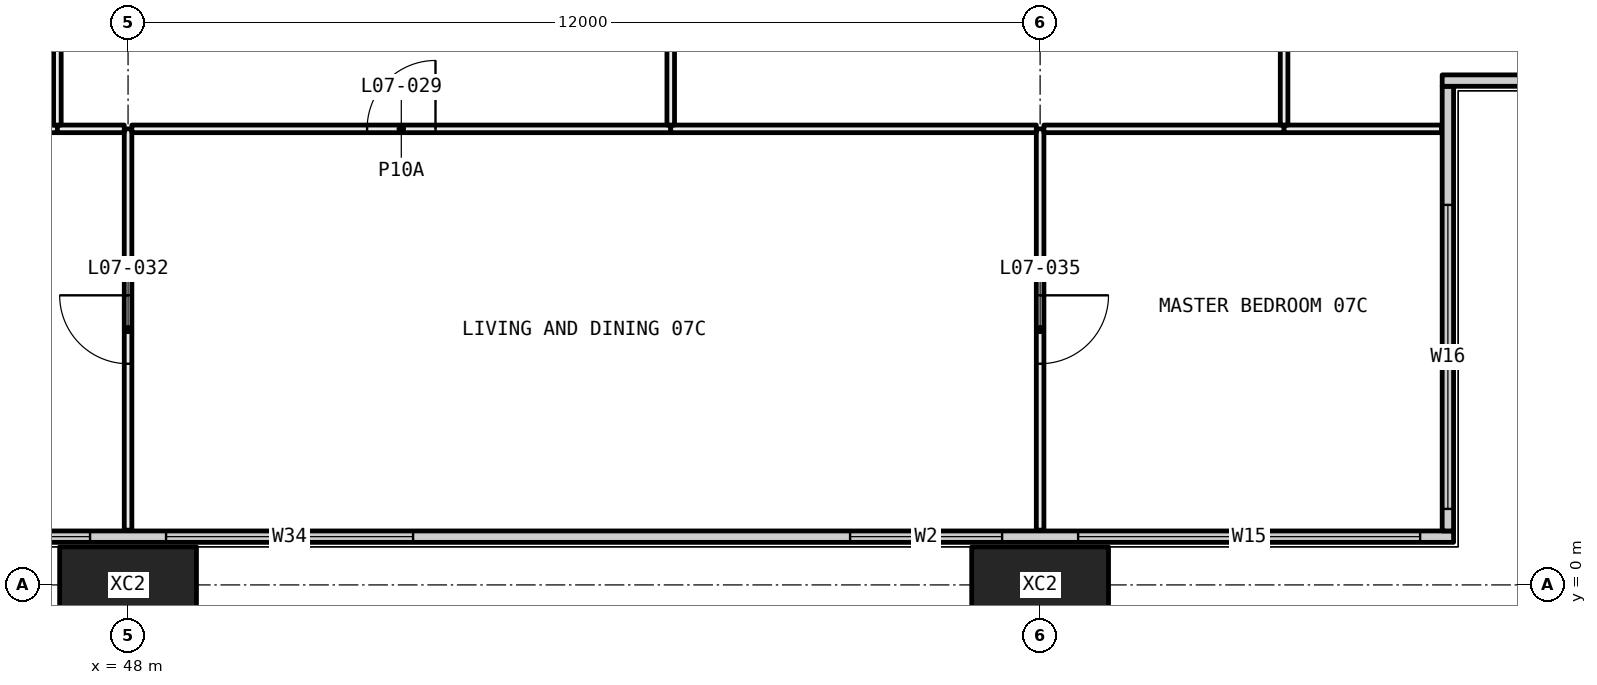
"""IFC4 building model, lengths in metres.
Left out: names, types, materials, properties, quantities, classifications, styles, units other than length and angle.
Written with IfcOpenShell. Run it as: python <this file> out.ifc"""

import sys

from ifc_helpers import new_model, si_unit, direction, frame, frame_2d, origin, origin_2d, place, context, subcontext, project, spatial, rectangle, hollow_rectangle, extrude, element, fill, save


model = new_model("IFC4")
c1 = context("Model", 3, precision=1e-05, world=origin(), true_north=direction((0.0, 1.0)))
c2 = subcontext(c1, "Body", "Model", "MODEL_VIEW")
j1 = project(units=[si_unit("LENGTHUNIT", "METRE"), si_unit("PLANEANGLEUNIT", "RADIAN")], contexts=[c1])
p1 = place(None, origin())
s1 = spatial("IfcSite", under=j1, at=p1, CompositionType="ELEMENT")
p2 = place(p1, origin())
s2 = spatial("IfcBuilding", under=s1, at=p2, CompositionType="ELEMENT")
p3 = place(p2, frame((0.0, 0.0, 36.9)))
s3 = spatial("IfcBuildingStorey", under=s2, at=p3, CompositionType="ELEMENT", Elevation=36.9)
for number, where, z_axis, x_axis in (
    (1, (48.0, 0.0, -0.4), (0.0, 0.0, 1.0), (1.0, 0.0, 0.0)),
    (2, (60.0, 0.0, -0.4), (0.0, 0.0, 1.0), (1.0, 0.0, 0.0)),
):
    element("IfcColumn", number, at=place(p3, frame(where, z_axis=z_axis, x_axis=x_axis)), inside=s3, PredefinedType="COLUMN", context=c2, shape_type="SweptSolid", body=[
        extrude(hollow_rectangle(XDim=1.8, YDim=1.0, WallThickness=0.07, at=origin_2d()), origin(), (0.0, 0.0, 1.0), 3.45),
    ])
p4 = place(p3, frame((6.56, 0.635, 0.0), z_axis=(0.0, 0.0, 1.0), x_axis=(1.0, 0.0, 0.0)))
e3 = element("IfcWall", 3, at=p4, inside=s3, PredefinedType="ELEMENTEDWALL", context=c2, shape_type="SweptSolid", body=[
    extrude(rectangle(XDim=58.88, YDim=0.15, at=frame_2d((29.44, 0.0))), origin(), (0.0, 0.0, 1.0), 3.05),
])
p5 = place(p4, frame((0.44, 0.0, 0.45)))
e4 = element("IfcOpeningElement", 4, at=p5, cuts=e3, PredefinedType="OPENING", context=c2, shape_type="SweptSolid", body=[
    extrude(rectangle(XDim=4.5, YDim=2.55, at=frame_2d((2.25, 1.275))), frame((0.0, 0.085, 0.0), z_axis=(0.0, -1.0, 0.0), x_axis=(1.0, 0.0, 0.0)), (0.0, 0.0, 1.0), 0.17),
])
p6 = place(p4, frame((5.94, 0.0, 0.45)))
e5 = element("IfcOpeningElement", 5, at=p6, cuts=e3, PredefinedType="OPENING", context=c2, shape_type="SweptSolid", body=[
    extrude(rectangle(XDim=3.25, YDim=2.55, at=frame_2d((1.625, 1.275))), frame((0.0, 0.085, 0.0), z_axis=(0.0, -1.0, 0.0), x_axis=(1.0, 0.0, 0.0)), (0.0, 0.0, 1.0), 0.17),
])
p7 = place(p4, frame((13.69, 0.0, 0.45)))
e6 = element("IfcOpeningElement", 6, at=p7, cuts=e3, PredefinedType="OPENING", context=c2, shape_type="SweptSolid", body=[
    extrude(rectangle(XDim=3.25, YDim=2.55, at=frame_2d((1.625, 1.275))), frame((0.0, 0.085, 0.0), z_axis=(0.0, -1.0, 0.0), x_axis=(1.0, 0.0, 0.0)), (0.0, 0.0, 1.0), 0.17),
])
p8 = place(p4, frame((17.94, 0.0, 0.45)))
e7 = element("IfcOpeningElement", 7, at=p8, cuts=e3, PredefinedType="OPENING", context=c2, shape_type="SweptSolid", body=[
    extrude(rectangle(XDim=3.25, YDim=2.55, at=frame_2d((1.625, 1.275))), frame((0.0, 0.085, 0.0), z_axis=(0.0, -1.0, 0.0), x_axis=(1.0, 0.0, 0.0)), (0.0, 0.0, 1.0), 0.17),
])
p9 = place(p4, frame((26.94, 0.0, 0.45)))
e8 = element("IfcOpeningElement", 8, at=p9, cuts=e3, PredefinedType="OPENING", context=c2, shape_type="SweptSolid", body=[
    extrude(rectangle(XDim=2.0, YDim=2.55, at=frame_2d((1.0, 1.275))), frame((0.0, 0.085, 0.0), z_axis=(0.0, -1.0, 0.0), x_axis=(1.0, 0.0, 0.0)), (0.0, 0.0, 1.0), 0.17),
])
p10 = place(p4, frame((29.94, 0.0, 0.45)))
e9 = element("IfcOpeningElement", 9, at=p10, cuts=e3, PredefinedType="OPENING", context=c2, shape_type="SweptSolid", body=[
    extrude(rectangle(XDim=3.25, YDim=2.55, at=frame_2d((1.625, 1.275))), frame((0.0, 0.085, 0.0), z_axis=(0.0, -1.0, 0.0), x_axis=(1.0, 0.0, 0.0)), (0.0, 0.0, 1.0), 0.17),
])
p11 = place(p4, frame((37.69, 0.0, 0.45)))
e10 = element("IfcOpeningElement", 10, at=p11, cuts=e3, PredefinedType="OPENING", context=c2, shape_type="SweptSolid", body=[
    extrude(rectangle(XDim=3.25, YDim=2.55, at=frame_2d((1.625, 1.275))), frame((0.0, 0.085, 0.0), z_axis=(0.0, -1.0, 0.0), x_axis=(1.0, 0.0, 0.0)), (0.0, 0.0, 1.0), 0.17),
])
p12 = place(p4, frame((41.94, 0.0, 0.45)))
e11 = element("IfcOpeningElement", 11, at=p12, cuts=e3, PredefinedType="OPENING", context=c2, shape_type="SweptSolid", body=[
    extrude(rectangle(XDim=3.25, YDim=2.55, at=frame_2d((1.625, 1.275))), frame((0.0, 0.085, 0.0), z_axis=(0.0, -1.0, 0.0), x_axis=(1.0, 0.0, 0.0)), (0.0, 0.0, 1.0), 0.17),
])
p13 = place(p4, frame((50.94, 0.0, 0.45)))
e12 = element("IfcOpeningElement", 12, at=p13, cuts=e3, PredefinedType="OPENING", context=c2, shape_type="SweptSolid", body=[
    extrude(rectangle(XDim=2.0, YDim=2.55, at=frame_2d((1.0, 1.275))), frame((0.0, 0.085, 0.0), z_axis=(0.0, -1.0, 0.0), x_axis=(1.0, 0.0, 0.0)), (0.0, 0.0, 1.0), 0.17),
])
p14 = place(p4, frame((53.94, 0.0, 0.45)))
e13 = element("IfcOpeningElement", 13, at=p14, cuts=e3, PredefinedType="OPENING", context=c2, shape_type="SweptSolid", body=[
    extrude(rectangle(XDim=4.5, YDim=2.55, at=frame_2d((2.25, 1.275))), frame((0.0, 0.085, 0.0), z_axis=(0.0, -1.0, 0.0), x_axis=(1.0, 0.0, 0.0)), (0.0, 0.0, 1.0), 0.17),
])
p15 = place(p3, frame((65.365, 0.71, 0.0), z_axis=(0.0, 0.0, 1.0), x_axis=(0.0, 1.0, 0.0)))
e14 = element("IfcWall", 14, at=p15, inside=s3, PredefinedType="ELEMENTEDWALL", context=c2, shape_type="SweptSolid", body=[
    extrude(rectangle(XDim=5.85, YDim=0.15, at=frame_2d((2.925, 0.0))), origin(), (0.0, 0.0, 1.0), 3.05),
])
p16 = place(p15, frame((0.29, 0.0, 0.45)))
e15 = element("IfcOpeningElement", 15, at=p16, cuts=e14, PredefinedType="OPENING", context=c2, shape_type="SweptSolid", body=[
    extrude(rectangle(XDim=4.0, YDim=2.55, at=frame_2d((2.0, 1.275))), frame((0.0, 0.085, 0.0), z_axis=(0.0, -1.0, 0.0), x_axis=(1.0, 0.0, 0.0)), (0.0, 0.0, 1.0), 0.17),
])
p17 = place(p3, frame((65.29, 6.635, 0.0), z_axis=(0.0, 0.0, 1.0), x_axis=(1.0, 0.0, 0.0)))
e16 = element("IfcWall", 16, at=p17, inside=s3, PredefinedType="ELEMENTEDWALL", context=c2, shape_type="SweptSolid", body=[
    extrude(rectangle(XDim=6.15, YDim=0.15, at=frame_2d((3.075, 0.0))), origin(), (0.0, 0.0, 1.0), 3.05),
])
p18 = place(p17, frame((1.71, 0.0, 0.45)))
e17 = element("IfcOpeningElement", 17, at=p18, cuts=e16, PredefinedType="OPENING", context=c2, shape_type="SweptSolid", body=[
    extrude(rectangle(XDim=4.0, YDim=2.55, at=frame_2d((2.0, 1.275))), frame((0.0, 0.085, 0.0), z_axis=(0.0, -1.0, 0.0), x_axis=(1.0, 0.0, 0.0)), (0.0, 0.0, 1.0), 0.17),
])
p19 = place(p3, frame((48.0, 0.72, 0.0), z_axis=(0.0, 0.0, 1.0), x_axis=(0.0, 1.0, 0.0)))
e18 = element("IfcWall", 18, at=p19, inside=s3, PredefinedType="PARTITIONING", context=c2, shape_type="SweptSolid", body=[
    extrude(rectangle(XDim=5.28, YDim=0.1, at=frame_2d((2.64, 0.0))), origin(), (0.0, 0.0, 1.0), 2.45),
])
p20 = place(p19, frame((2.19, 0.0, 0.0)))
e19 = element("IfcOpeningElement", 19, at=p20, cuts=e18, PredefinedType="OPENING", context=c2, shape_type="SweptSolid", body=[
    extrude(rectangle(XDim=0.9, YDim=2.1, at=frame_2d((0.45, 1.05))), frame((0.0, 0.06, 0.0), z_axis=(0.0, -1.0, 0.0), x_axis=(1.0, 0.0, 0.0)), (0.0, 0.0, 1.0), 0.12),
])
p21 = place(p3, frame((47.07, 6.0, 0.0), z_axis=(0.0, 0.0, 1.0), x_axis=(-1.0, 0.0, 0.0)))
e20 = element("IfcWall", 20, at=p21, inside=s3, PredefinedType="PARTITIONING", context=c2, shape_type="SweptSolid", body=[
    extrude(rectangle(XDim=5.02, YDim=0.1, at=frame_2d((2.51, 0.0))), origin(), (0.0, 0.0, 1.0), 3.05),
])
p22 = place(p3, frame((47.95, 6.0, 0.0), z_axis=(0.0, 0.0, 1.0), x_axis=(-1.0, 0.0, 0.0)))
e21 = element("IfcWall", 21, at=p22, inside=s3, PredefinedType="PARTITIONING", context=c2, shape_type="SweptSolid", body=[
    extrude(rectangle(XDim=0.88, YDim=0.1, at=frame_2d((0.44, 0.0))), origin(), (0.0, 0.0, 1.0), 2.45),
])
p23 = place(p3, frame((60.0, 0.72, 0.0), z_axis=(0.0, 0.0, 1.0), x_axis=(0.0, 1.0, 0.0)))
e22 = element("IfcWall", 22, at=p23, inside=s3, PredefinedType="PARTITIONING", context=c2, shape_type="SweptSolid", body=[
    extrude(rectangle(XDim=5.28, YDim=0.1, at=frame_2d((2.64, 0.0))), origin(), (0.0, 0.0, 1.0), 2.45),
])
p24 = place(p23, frame((2.19, 0.0, 0.0)))
e23 = element("IfcOpeningElement", 23, at=p24, cuts=e22, PredefinedType="OPENING", context=c2, shape_type="SweptSolid", body=[
    extrude(rectangle(XDim=0.9, YDim=2.1, at=frame_2d((0.45, 1.05))), frame((0.0, 0.06, 0.0), z_axis=(0.0, -1.0, 0.0), x_axis=(1.0, 0.0, 0.0)), (0.0, 0.0, 1.0), 0.12),
])
p25 = place(p3, frame((55.14, 6.0, 0.0), z_axis=(0.0, 0.0, 1.0), x_axis=(-1.0, 0.0, 0.0)))
e24 = element("IfcWall", 24, at=p25, inside=s3, PredefinedType="PARTITIONING", context=c2, shape_type="SweptSolid", body=[
    extrude(rectangle(XDim=7.09, YDim=0.1, at=frame_2d((3.545, 0.0))), origin(), (0.0, 0.0, 1.0), 2.45),
])
p26 = place(p25, frame((3.095, 0.0, 0.0)))
e25 = element("IfcOpeningElement", 25, at=p26, cuts=e24, PredefinedType="OPENING", context=c2, shape_type="SweptSolid", body=[
    extrude(rectangle(XDim=0.9, YDim=2.1, at=frame_2d((0.45, 1.05))), frame((0.0, 0.06, 0.0), z_axis=(0.0, -1.0, 0.0), x_axis=(1.0, 0.0, 0.0)), (0.0, 0.0, 1.0), 0.12),
])
p27 = place(p3, frame((59.95, 6.0, 0.0), z_axis=(0.0, 0.0, 1.0), x_axis=(-1.0, 0.0, 0.0)))
e26 = element("IfcWall", 26, at=p27, inside=s3, PredefinedType="PARTITIONING", context=c2, shape_type="SweptSolid", body=[
    extrude(rectangle(XDim=4.81, YDim=0.1, at=frame_2d((2.405, 0.0))), origin(), (0.0, 0.0, 1.0), 2.45),
])
p28 = place(p3, frame((63.21, 6.0, 0.0), z_axis=(0.0, 0.0, 1.0), x_axis=(-1.0, 0.0, 0.0)))
e27 = element("IfcWall", 27, at=p28, inside=s3, PredefinedType="PARTITIONING", context=c2, shape_type="SweptSolid", body=[
    extrude(rectangle(XDim=3.16, YDim=0.1, at=frame_2d((1.58, 0.0))), origin(), (0.0, 0.0, 1.0), 2.45),
])
p29 = place(p3, frame((65.28, 6.0, 0.0), z_axis=(0.0, 0.0, 1.0), x_axis=(-1.0, 0.0, 0.0)))
e28 = element("IfcWall", 28, at=p29, inside=s3, PredefinedType="PARTITIONING", context=c2, shape_type="SweptSolid", body=[
    extrude(rectangle(XDim=2.07, YDim=0.1, at=frame_2d((1.035, 0.0))), origin(), (0.0, 0.0, 1.0), 3.05),
])
p30 = place(p3, frame((47.07, 6.05, 0.0), z_axis=(0.0, 0.0, 1.0), x_axis=(0.0, 1.0, 0.0)))
e29 = element("IfcWall", 29, at=p30, inside=s3, PredefinedType="PARTITIONING", context=c2, shape_type="SweptSolid", body=[
    extrude(rectangle(XDim=5.95, YDim=0.1, at=frame_2d((2.975, 0.0))), origin(), (0.0, 0.0, 1.0), 2.45),
])
p31 = place(p30, frame((2.525, 0.0, 0.0)))
e30 = element("IfcOpeningElement", 30, at=p31, cuts=e29, PredefinedType="OPENING", context=c2, shape_type="SweptSolid", body=[
    extrude(rectangle(XDim=0.9, YDim=2.1, at=frame_2d((0.45, 1.05))), frame((0.0, 0.06, 0.0), z_axis=(0.0, -1.0, 0.0), x_axis=(1.0, 0.0, 0.0)), (0.0, 0.0, 1.0), 0.12),
])
p32 = place(p3, frame((55.14, 6.05, 0.0), z_axis=(0.0, 0.0, 1.0), x_axis=(0.0, 1.0, 0.0)))
e31 = element("IfcWall", 31, at=p32, inside=s3, PredefinedType="PARTITIONING", context=c2, shape_type="SweptSolid", body=[
    extrude(rectangle(XDim=5.95, YDim=0.1, at=frame_2d((2.975, 0.0))), origin(), (0.0, 0.0, 1.0), 2.45),
])
p33 = place(p32, frame((2.525, 0.0, 0.0)))
e32 = element("IfcOpeningElement", 32, at=p33, cuts=e31, PredefinedType="OPENING", context=c2, shape_type="SweptSolid", body=[
    extrude(rectangle(XDim=0.9, YDim=2.1, at=frame_2d((0.45, 1.05))), frame((0.0, 0.06, 0.0), z_axis=(0.0, -1.0, 0.0), x_axis=(1.0, 0.0, 0.0)), (0.0, 0.0, 1.0), 0.12),
])
p34 = place(p3, frame((63.21, 6.05, 0.0), z_axis=(0.0, 0.0, 1.0), x_axis=(0.0, 1.0, 0.0)))
e33 = element("IfcWall", 33, at=p34, inside=s3, PredefinedType="PARTITIONING", context=c2, shape_type="SweptSolid", body=[
    extrude(rectangle(XDim=5.875, YDim=0.1, at=frame_2d((2.938, 0.0))), origin(), (0.0, 0.0, 1.0), 2.45),
])
p35 = place(p34, frame((2.488, 0.0, 0.0)))
e34 = element("IfcOpeningElement", 34, at=p35, cuts=e33, PredefinedType="OPENING", context=c2, shape_type="SweptSolid", body=[
    extrude(rectangle(XDim=0.9, YDim=2.1, at=frame_2d((0.45, 1.05))), frame((0.0, 0.06, 0.0), z_axis=(0.0, -1.0, 0.0), x_axis=(1.0, 0.0, 0.0)), (0.0, 0.0, 1.0), 0.12),
])
p36 = place(p11, origin())
e35 = element("IfcWindow", 35, at=p36, inside=s3, PartitioningType="SINGLE_PANEL", PredefinedType="WINDOW", context=c2, shape_type="SweptSolid", body=[
    extrude(rectangle(XDim=3.25, YDim=2.55, at=frame_2d((1.625, 1.275))), frame((0.0, 0.03, 0.0), z_axis=(0.0, -1.0, 0.0), x_axis=(1.0, 0.0, 0.0)), (0.0, 0.0, 1.0), 0.06),
])
fill(e10, e35)
p37 = place(p12, origin())
e36 = element("IfcWindow", 36, at=p37, inside=s3, PartitioningType="SINGLE_PANEL", PredefinedType="WINDOW", context=c2, shape_type="SweptSolid", body=[
    extrude(rectangle(XDim=3.25, YDim=2.55, at=frame_2d((1.625, 1.275))), frame((0.0, 0.03, 0.0), z_axis=(0.0, -1.0, 0.0), x_axis=(1.0, 0.0, 0.0)), (0.0, 0.0, 1.0), 0.06),
])
fill(e11, e36)
p38 = place(p13, origin())
e37 = element("IfcWindow", 37, at=p38, inside=s3, PartitioningType="SINGLE_PANEL", PredefinedType="WINDOW", context=c2, shape_type="SweptSolid", body=[
    extrude(rectangle(XDim=2.0, YDim=2.55, at=frame_2d((1.0, 1.275))), frame((0.0, 0.03, 0.0), z_axis=(0.0, -1.0, 0.0), x_axis=(1.0, 0.0, 0.0)), (0.0, 0.0, 1.0), 0.06),
])
fill(e12, e37)
p39 = place(p14, origin())
e38 = element("IfcWindow", 38, at=p39, inside=s3, PartitioningType="SINGLE_PANEL", PredefinedType="WINDOW", context=c2, shape_type="SweptSolid", body=[
    extrude(rectangle(XDim=4.5, YDim=2.55, at=frame_2d((2.25, 1.275))), frame((0.0, 0.03, 0.0), z_axis=(0.0, -1.0, 0.0), x_axis=(1.0, 0.0, 0.0)), (0.0, 0.0, 1.0), 0.06),
])
fill(e13, e38)
p40 = place(p16, origin())
e39 = element("IfcWindow", 39, at=p40, inside=s3, PartitioningType="SINGLE_PANEL", PredefinedType="WINDOW", context=c2, shape_type="SweptSolid", body=[
    extrude(rectangle(XDim=4.0, YDim=2.55, at=frame_2d((2.0, 1.275))), frame((0.0, 0.03, 0.0), z_axis=(0.0, -1.0, 0.0), x_axis=(1.0, 0.0, 0.0)), (0.0, 0.0, 1.0), 0.06),
])
fill(e15, e39)
p41 = place(p26, frame((0.9, 0.0, 0.0), x_axis=(-1.0, 0.0, 0.0)))
e40 = element("IfcDoor", 40, at=p41, inside=s3, OperationType="SINGLE_SWING_LEFT", PredefinedType="DOOR", context=c2, shape_type="SweptSolid", body=[
    extrude(rectangle(XDim=0.9, YDim=2.1, at=frame_2d((0.45, 1.05))), frame((0.0, 0.025, 0.0), z_axis=(0.0, -1.0, 0.0), x_axis=(1.0, 0.0, 0.0)), (0.0, 0.0, 1.0), 0.05),
])
fill(e25, e40)
p42 = place(p20, origin())
e41 = element("IfcDoor", 41, at=p42, inside=s3, OperationType="SINGLE_SWING_LEFT", PredefinedType="DOOR", context=c2, shape_type="SweptSolid", body=[
    extrude(rectangle(XDim=0.9, YDim=2.1, at=frame_2d((0.45, 1.05))), frame((0.0, 0.025, 0.0), z_axis=(0.0, -1.0, 0.0), x_axis=(1.0, 0.0, 0.0)), (0.0, 0.0, 1.0), 0.05),
])
fill(e19, e41)
p43 = place(p24, frame((0.9, 0.0, 0.0), x_axis=(-1.0, 0.0, 0.0)))
e42 = element("IfcDoor", 42, at=p43, inside=s3, OperationType="SINGLE_SWING_RIGHT", PredefinedType="DOOR", context=c2, shape_type="SweptSolid", body=[
    extrude(rectangle(XDim=0.9, YDim=2.1, at=frame_2d((0.45, 1.05))), frame((0.0, 0.025, 0.0), z_axis=(0.0, -1.0, 0.0), x_axis=(1.0, 0.0, 0.0)), (0.0, 0.0, 1.0), 0.05),
])
fill(e23, e42)
save(model, sys.argv[1])
